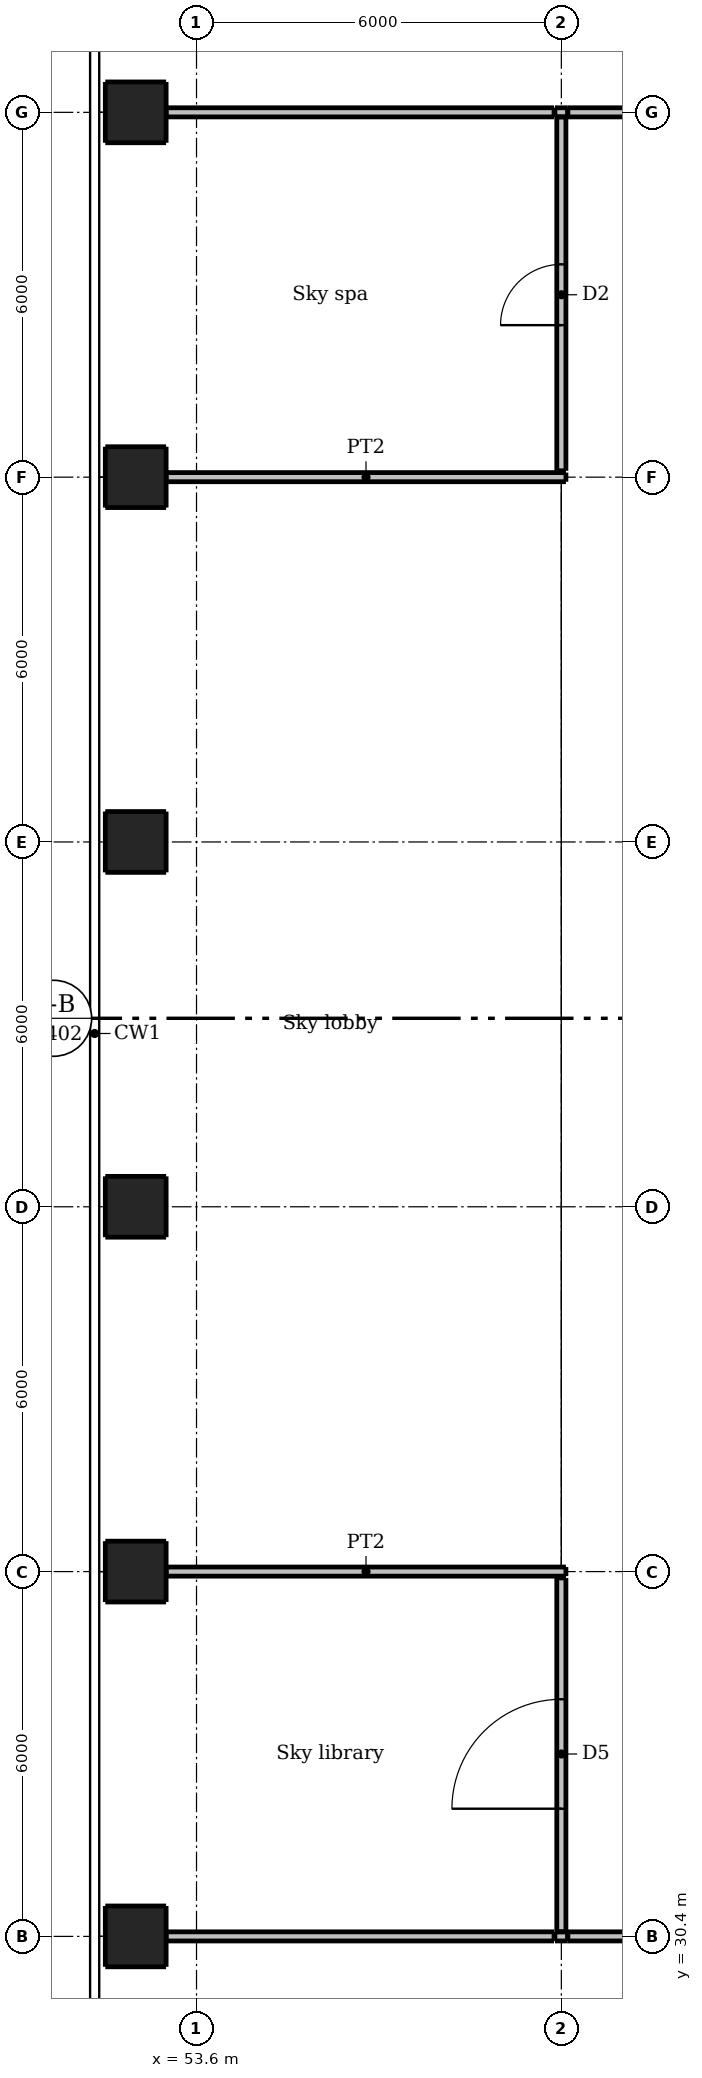
"""IFC4 building model, lengths in metres.
Left out: names, types, materials, properties, quantities, classifications, styles, units other than length and angle.
Written with IfcOpenShell. Run it as: python <this file> out.ifc"""

import sys

from ifc_helpers import new_model, si_unit, direction, frame, frame_2d, origin, origin_2d, place, context, subcontext, project, spatial, rectangle, extrude, element, fill, save


model = new_model("IFC4")
c1 = context("Model", 3, precision=1e-05, world=origin(), true_north=direction((0.0, 1.0)))
c2 = subcontext(c1, "Body", "Model", "MODEL_VIEW")
j1 = project(units=[si_unit("LENGTHUNIT", "METRE"), si_unit("PLANEANGLEUNIT", "RADIAN")], contexts=[c1])
p1 = place(None, origin())
s1 = spatial("IfcSite", under=j1, at=p1, CompositionType="ELEMENT")
p2 = place(p1, origin())
s2 = spatial("IfcBuilding", under=s1, at=p2, CompositionType="ELEMENT")
p3 = place(p2, frame((0.0, 0.0, 150.4)))
s3 = spatial("IfcBuildingStorey", under=s2, at=p3, CompositionType="ELEMENT", Elevation=150.4)
for number, where, z_axis, x_axis in (
    (1, (52.6, 30.4, 0.0), (0.0, 0.0, 1.0), (1.0, 0.0, 0.0)),
    (2, (52.6, 36.4, 0.0), (0.0, 0.0, 1.0), (1.0, 0.0, 0.0)),
    (3, (52.6, 42.4, 0.0), (0.0, 0.0, 1.0), (1.0, 0.0, 0.0)),
    (4, (52.6, 48.4, 0.0), (0.0, 0.0, 1.0), (1.0, 0.0, 0.0)),
    (5, (52.6, 54.4, 0.0), (0.0, 0.0, 1.0), (1.0, 0.0, 0.0)),
    (6, (52.6, 60.4, 0.0), (0.0, 0.0, 1.0), (1.0, 0.0, 0.0)),
):
    element("IfcColumn", number, at=place(p3, frame(where, z_axis=z_axis, x_axis=x_axis)), inside=s3, PredefinedType="COLUMN", context=c2, shape_type="SweptSolid", body=[
        extrude(rectangle(XDim=1.0, YDim=1.0, at=origin_2d()), origin(), (0.0, 0.0, 1.0), 4.25),
    ])
p4 = place(p3, frame((53.1, 30.4, 0.0), z_axis=(0.0, 0.0, 1.0), x_axis=(1.0, 0.0, 0.0)))
e7 = element("IfcWall", 7, at=p4, inside=s3, PredefinedType="PARTITIONING", context=c2, shape_type="SweptSolid", body=[
    extrude(rectangle(XDim=6.38, YDim=0.15, at=frame_2d((3.19, 0.0))), origin(), (0.0, 0.0, 1.0), 3.847),
])
p5 = place(p3, frame((59.495, 30.4, 0.0), z_axis=(0.0, 0.0, 1.0), x_axis=(1.0, 0.0, 0.0)))
e8 = element("IfcWall", 8, at=p5, inside=s3, PredefinedType="PARTITIONING", context=c2, shape_type="SweptSolid", body=[
    extrude(rectangle(XDim=0.211, YDim=0.15, at=frame_2d((0.105, 0.0))), origin(), (0.0, 0.0, 1.0), 3.711),
])
p6 = place(p3, frame((59.705, 30.4, 0.0), z_axis=(0.0, 0.0, 1.0), x_axis=(1.0, 0.0, 0.0)))
e9 = element("IfcWall", 9, at=p6, inside=s3, PredefinedType="PARTITIONING", context=c2, shape_type="SweptSolid", body=[
    extrude(rectangle(XDim=5.79, YDim=0.15, at=frame_2d((2.895, 0.0))), origin(), (0.0, 0.0, 1.0), 4.25),
])
for number, where, z_axis, x_axis in (
    (10, (53.1, 36.4, 0.0), (0.0, 0.0, 1.0), (1.0, 0.0, 0.0)),
    (11, (53.1, 54.4, 0.0), (0.0, 0.0, 1.0), (1.0, 0.0, 0.0)),
):
    element("IfcWall", number, at=place(p3, frame(where, z_axis=z_axis, x_axis=x_axis)), inside=s3, PredefinedType="PARTITIONING", context=c2, shape_type="SweptSolid", body=[
        extrude(rectangle(XDim=6.575, YDim=0.15, at=frame_2d((3.288, 0.0))), origin(), (0.0, 0.0, 1.0), 3.717),
    ])
p7 = place(p3, frame((53.1, 60.4, 0.0), z_axis=(0.0, 0.0, 1.0), x_axis=(1.0, 0.0, 0.0)))
e12 = element("IfcWall", 12, at=p7, inside=s3, PredefinedType="PARTITIONING", context=c2, shape_type="SweptSolid", body=[
    extrude(rectangle(XDim=6.38, YDim=0.15, at=frame_2d((3.19, 0.0))), origin(), (0.0, 0.0, 1.0), 3.847),
])
p8 = place(p3, frame((59.495, 60.4, 0.0), z_axis=(0.0, 0.0, 1.0), x_axis=(1.0, 0.0, 0.0)))
e13 = element("IfcWall", 13, at=p8, inside=s3, PredefinedType="PARTITIONING", context=c2, shape_type="SweptSolid", body=[
    extrude(rectangle(XDim=0.211, YDim=0.15, at=frame_2d((0.105, 0.0))), origin(), (0.0, 0.0, 1.0), 3.711),
])
p9 = place(p3, frame((59.705, 60.4, 0.0), z_axis=(0.0, 0.0, 1.0), x_axis=(1.0, 0.0, 0.0)))
e14 = element("IfcWall", 14, at=p9, inside=s3, PredefinedType="PARTITIONING", context=c2, shape_type="SweptSolid", body=[
    extrude(rectangle(XDim=5.79, YDim=0.15, at=frame_2d((2.895, 0.0))), origin(), (0.0, 0.0, 1.0), 4.25),
])
p10 = place(p9, frame((2.395, 0.0, 0.0)))
e15 = element("IfcOpeningElement", 15, at=p10, cuts=e14, PredefinedType="OPENING", context=c2, shape_type="SweptSolid", body=[
    extrude(rectangle(XDim=1.0, YDim=2.1, at=frame_2d((0.5, 1.05))), frame((0.0, 0.085, 0.0), z_axis=(0.0, -1.0, 0.0), x_axis=(1.0, 0.0, 0.0)), (0.0, 0.0, 1.0), 0.17),
])
p11 = place(p3, frame((59.6, 30.475, 0.0), z_axis=(0.0, 0.0, 1.0), x_axis=(0.0, 1.0, 0.0)))
e16 = element("IfcWall", 16, at=p11, inside=s3, PredefinedType="PARTITIONING", context=c2, shape_type="SweptSolid", body=[
    extrude(rectangle(XDim=5.82, YDim=0.15, at=frame_2d((2.91, 0.0))), origin(), (0.0, 0.0, 1.0), 3.711),
])
p12 = place(p11, frame((2.025, 0.0, 0.0)))
e17 = element("IfcOpeningElement", 17, at=p12, cuts=e16, PredefinedType="OPENING", context=c2, shape_type="SweptSolid", body=[
    extrude(rectangle(XDim=1.8, YDim=2.1, at=frame_2d((0.9, 1.05))), frame((0.0, 0.085, 0.0), z_axis=(0.0, -1.0, 0.0), x_axis=(1.0, 0.0, 0.0)), (0.0, 0.0, 1.0), 0.17),
])
p13 = place(p3, frame((59.6, 54.505, 0.0), z_axis=(0.0, 0.0, 1.0), x_axis=(0.0, 1.0, 0.0)))
e18 = element("IfcWall", 18, at=p13, inside=s3, PredefinedType="PARTITIONING", context=c2, shape_type="SweptSolid", body=[
    extrude(rectangle(XDim=5.82, YDim=0.15, at=frame_2d((2.91, 0.0))), origin(), (0.0, 0.0, 1.0), 3.711),
])
p14 = place(p13, frame((2.396, 0.0, 0.0)))
e19 = element("IfcOpeningElement", 19, at=p14, cuts=e18, PredefinedType="OPENING", context=c2, shape_type="SweptSolid", body=[
    extrude(rectangle(XDim=1.0, YDim=2.1, at=frame_2d((0.5, 1.05))), frame((0.0, 0.085, 0.0), z_axis=(0.0, -1.0, 0.0), x_axis=(1.0, 0.0, 0.0)), (0.0, 0.0, 1.0), 0.17),
])
p15 = place(p12, origin())
e20 = element("IfcDoor", 20, at=p15, inside=s3, OperationType="DOUBLE_DOOR_SINGLE_SWING", PredefinedType="DOOR", context=c2, shape_type="SweptSolid", body=[
    extrude(rectangle(XDim=1.8, YDim=2.1, at=frame_2d((0.9, 1.05))), frame((0.0, 0.025, 0.0), z_axis=(0.0, -1.0, 0.0), x_axis=(1.0, 0.0, 0.0)), (0.0, 0.0, 1.0), 0.05),
])
fill(e17, e20)
p16 = place(p14, origin())
e21 = element("IfcDoor", 21, at=p16, inside=s3, OperationType="SINGLE_SWING_LEFT", PredefinedType="DOOR", context=c2, shape_type="SweptSolid", body=[
    extrude(rectangle(XDim=1.0, YDim=2.1, at=frame_2d((0.5, 1.05))), frame((0.0, 0.025, 0.0), z_axis=(0.0, -1.0, 0.0), x_axis=(1.0, 0.0, 0.0)), (0.0, 0.0, 1.0), 0.05),
])
fill(e19, e21)
save(model, sys.argv[1])
